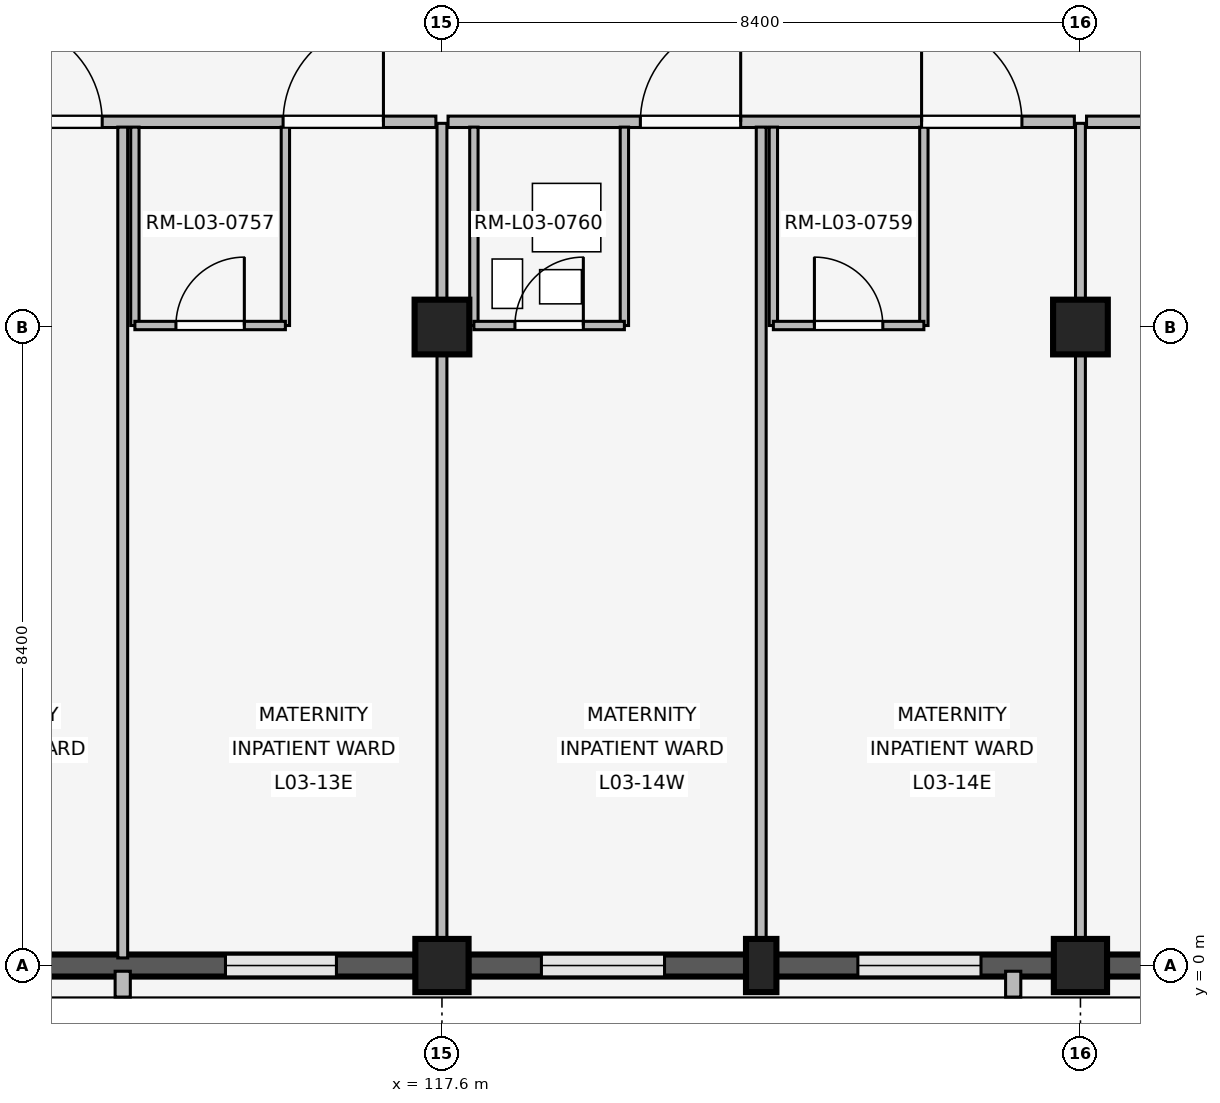
"""IFC4 building model, lengths in metres.
Left out: names, types, materials, properties, quantities, classifications, styles, units other than length and angle.
Written with IfcOpenShell. Run it as: python <this file> out.ifc"""

import sys

from ifc_helpers import new_model, si_unit, direction, frame, frame_2d, origin, origin_2d, place, context, subcontext, project, spatial, rectangle, extrude, element, fill, save


model = new_model("IFC4")
c1 = context("Model", 3, precision=1e-05, world=origin(), true_north=direction((0.0, 1.0)))
c2 = subcontext(c1, "Body", "Model", "MODEL_VIEW")
j1 = project(units=[si_unit("LENGTHUNIT", "METRE"), si_unit("PLANEANGLEUNIT", "RADIAN")], contexts=[c1])
p1 = place(None, origin())
s1 = spatial("IfcSite", under=j1, at=p1, CompositionType="ELEMENT")
p2 = place(p1, origin())
s2 = spatial("IfcBuilding", under=s1, at=p2, CompositionType="ELEMENT")
p3 = place(p2, frame((0.0, 0.0, 12.9)))
s3 = spatial("IfcBuildingStorey", under=s2, at=p3, CompositionType="ELEMENT", Elevation=12.9)
p4 = place(p3, frame((117.6, 0.0, 0.0), z_axis=(0.0, 0.0, 1.0), x_axis=(1.0, 0.0, 0.0)))
e1 = element("IfcColumn", 1, at=p4, inside=s3, PredefinedType="COLUMN", context=c2, shape_type="SweptSolid", body=[
    extrude(rectangle(XDim=0.7, YDim=0.7, at=origin_2d()), origin(), (0.0, 0.0, 1.0), 3.3),
])
p5 = place(p3, frame((117.6, 8.4, 0.0), z_axis=(0.0, 0.0, 1.0), x_axis=(1.0, 0.0, 0.0)))
e2 = element("IfcColumn", 2, at=p5, inside=s3, PredefinedType="COLUMN", context=c2, shape_type="SweptSolid", body=[
    extrude(rectangle(XDim=0.72, YDim=0.72, at=origin_2d()), origin(), (0.0, 0.0, 1.0), 3.3),
])
p6 = place(p3, frame((126.0, 0.0, 0.0), z_axis=(0.0, 0.0, 1.0), x_axis=(1.0, 0.0, 0.0)))
e3 = element("IfcColumn", 3, at=p6, inside=s3, PredefinedType="COLUMN", context=c2, shape_type="SweptSolid", body=[
    extrude(rectangle(XDim=0.7, YDim=0.7, at=origin_2d()), origin(), (0.0, 0.0, 1.0), 3.3),
])
p7 = place(p3, frame((126.0, 8.4, 0.0), z_axis=(0.0, 0.0, 1.0), x_axis=(1.0, 0.0, 0.0)))
e4 = element("IfcColumn", 4, at=p7, inside=s3, PredefinedType="COLUMN", context=c2, shape_type="SweptSolid", body=[
    extrude(rectangle(XDim=0.72, YDim=0.72, at=origin_2d()), origin(), (0.0, 0.0, 1.0), 3.3),
])
p8 = place(p3, frame((121.8, 0.0, 0.0), z_axis=(0.0, 0.0, 1.0), x_axis=(1.0, 0.0, 0.0)))
e5 = element("IfcColumn", 5, at=p8, inside=s3, PredefinedType="PILASTER", context=c2, shape_type="SweptSolid", body=[
    extrude(rectangle(XDim=0.4, YDim=0.7, at=origin_2d()), origin(), (0.0, 0.0, 1.0), 3.3),
])
p9 = place(p3, frame((117.255, 0.0, 0.0), z_axis=(0.0, 0.0, 1.0), x_axis=(-1.0, 0.0, 0.0)))
e6 = element("IfcWall", 6, at=p9, inside=s3, PredefinedType="SOLIDWALL", context=c2, shape_type="SweptSolid", body=[
    extrude(rectangle(XDim=7.71, YDim=0.29, at=frame_2d((3.855, 0.0))), origin(), (0.0, 0.0, 1.0), 2.44),
])
p10 = place(p9, frame((1.043, 0.0, 0.85)))
e7 = element("IfcOpeningElement", 7, at=p10, cuts=e6, PredefinedType="OPENING", context=c2, shape_type="SweptSolid", body=[
    extrude(rectangle(XDim=1.46, YDim=0.85, at=frame_2d((0.73, 0.425))), frame((0.0, 0.155, 0.0), z_axis=(0.0, -1.0, 0.0), x_axis=(1.0, 0.0, 0.0)), (0.0, 0.0, 1.0), 0.31),
])
p11 = place(p9, frame((5.207, 0.0, 0.85)))
e8 = element("IfcOpeningElement", 8, at=p11, cuts=e6, PredefinedType="OPENING", context=c2, shape_type="SweptSolid", body=[
    extrude(rectangle(XDim=1.46, YDim=0.85, at=frame_2d((0.73, 0.425))), frame((0.0, 0.155, 0.0), z_axis=(0.0, -1.0, 0.0), x_axis=(1.0, 0.0, 0.0)), (0.0, 0.0, 1.0), 0.31),
])
p12 = place(p3, frame((113.4, -0.075, 0.0), z_axis=(0.0, 0.0, 1.0), x_axis=(0.0, -1.0, 0.0)))
e9 = element("IfcWall", 9, at=p12, inside=s3, PredefinedType="ELEMENTEDWALL", context=c2, shape_type="SweptSolid", body=[
    extrude(rectangle(XDim=0.34, YDim=0.2, at=frame_2d((0.17, 0.0))), origin(), (0.0, 0.0, 1.0), 2.42),
])
p13 = place(p3, frame((125.655, 0.0, 0.0), z_axis=(0.0, 0.0, 1.0), x_axis=(-1.0, 0.0, 0.0)))
e10 = element("IfcWall", 10, at=p13, inside=s3, PredefinedType="SOLIDWALL", context=c2, shape_type="SweptSolid", body=[
    extrude(rectangle(XDim=7.71, YDim=0.29, at=frame_2d((3.855, 0.0))), origin(), (0.0, 0.0, 1.0), 2.44),
])
p14 = place(p13, frame((0.963, 0.0, 0.85)))
e11 = element("IfcOpeningElement", 11, at=p14, cuts=e10, PredefinedType="OPENING", context=c2, shape_type="SweptSolid", body=[
    extrude(rectangle(XDim=1.62, YDim=0.95, at=frame_2d((0.81, 0.475))), frame((0.0, 0.155, 0.0), z_axis=(0.0, -1.0, 0.0), x_axis=(1.0, 0.0, 0.0)), (0.0, 0.0, 1.0), 0.31),
])
p15 = place(p13, frame((5.127, 0.0, 0.85)))
e12 = element("IfcOpeningElement", 12, at=p15, cuts=e10, PredefinedType="OPENING", context=c2, shape_type="SweptSolid", body=[
    extrude(rectangle(XDim=1.62, YDim=0.95, at=frame_2d((0.81, 0.475))), frame((0.0, 0.155, 0.0), z_axis=(0.0, -1.0, 0.0), x_axis=(1.0, 0.0, 0.0)), (0.0, 0.0, 1.0), 0.31),
])
p16 = place(p3, frame((125.115, -0.075, 0.0), z_axis=(0.0, 0.0, 1.0), x_axis=(0.0, -1.0, 0.0)))
e13 = element("IfcWall", 13, at=p16, inside=s3, PredefinedType="ELEMENTEDWALL", context=c2, shape_type="SweptSolid", body=[
    extrude(rectangle(XDim=0.34, YDim=0.2, at=frame_2d((0.17, 0.0))), origin(), (0.0, 0.0, 1.0), 2.42),
])
p17 = place(p3, frame((134.055, 0.0, 0.0), z_axis=(0.0, 0.0, 1.0), x_axis=(-1.0, 0.0, 0.0)))
e14 = element("IfcWall", 14, at=p17, inside=s3, PredefinedType="SOLIDWALL", context=c2, shape_type="SweptSolid", body=[
    extrude(rectangle(XDim=7.71, YDim=0.29, at=frame_2d((3.855, 0.0))), origin(), (0.0, 0.0, 1.0), 2.44),
])
p18 = place(p17, frame((1.043, 0.0, 0.85)))
e15 = element("IfcOpeningElement", 15, at=p18, cuts=e14, PredefinedType="OPENING", context=c2, shape_type="SweptSolid", body=[
    extrude(rectangle(XDim=1.46, YDim=0.85, at=frame_2d((0.73, 0.425))), frame((0.0, 0.155, 0.0), z_axis=(0.0, -1.0, 0.0), x_axis=(1.0, 0.0, 0.0)), (0.0, 0.0, 1.0), 0.31),
])
p19 = place(p17, frame((5.207, 0.0, 0.85)))
e16 = element("IfcOpeningElement", 16, at=p19, cuts=e14, PredefinedType="OPENING", context=c2, shape_type="SweptSolid", body=[
    extrude(rectangle(XDim=1.46, YDim=0.85, at=frame_2d((0.73, 0.425))), frame((0.0, 0.155, 0.0), z_axis=(0.0, -1.0, 0.0), x_axis=(1.0, 0.0, 0.0)), (0.0, 0.0, 1.0), 0.31),
])
p20 = place(p3, frame((109.28, 11.1, 0.0), z_axis=(0.0, 0.0, 1.0), x_axis=(1.0, 0.0, 0.0)))
e17 = element("IfcWall", 17, at=p20, inside=s3, PredefinedType="PARTITIONING", context=c2, shape_type="SweptSolid", body=[
    extrude(rectangle(XDim=8.24, YDim=0.15, at=frame_2d((4.12, 0.0))), origin(), (0.0, 0.0, 1.0), 2.42),
])
p21 = place(p20, frame((2.53, 0.0, 0.0)))
e18 = element("IfcOpeningElement", 18, at=p21, cuts=e17, PredefinedType="OPENING", context=c2, shape_type="SweptSolid", body=[
    extrude(rectangle(XDim=1.32, YDim=2.25, at=frame_2d((0.66, 1.125))), frame((0.0, 0.085, 0.0), z_axis=(0.0, -1.0, 0.0), x_axis=(1.0, 0.0, 0.0)), (0.0, 0.0, 1.0), 0.17),
])
p22 = place(p20, frame((6.23, 0.0, 0.0)))
e19 = element("IfcOpeningElement", 19, at=p22, cuts=e17, PredefinedType="OPENING", context=c2, shape_type="SweptSolid", body=[
    extrude(rectangle(XDim=1.32, YDim=2.25, at=frame_2d((0.66, 1.125))), frame((0.0, 0.085, 0.0), z_axis=(0.0, -1.0, 0.0), x_axis=(1.0, 0.0, 0.0)), (0.0, 0.0, 1.0), 0.17),
])
p23 = place(p3, frame((113.4, 0.1, 0.0), z_axis=(0.0, 0.0, 1.0), x_axis=(0.0, 1.0, 0.0)))
e20 = element("IfcWall", 20, at=p23, inside=s3, PredefinedType="PARTITIONING", context=c2, shape_type="SweptSolid", body=[
    extrude(rectangle(XDim=10.93, YDim=0.13, at=frame_2d((5.465, 0.0))), origin(), (0.0, 0.0, 1.0), 2.42),
])
for number, where, z_axis, x_axis in (
    (21, (113.56, 8.42, 0.0), (0.0, 0.0, 1.0), (0.0, 1.0, 0.0)),
    (22, (115.54, 8.42, 0.0), (0.0, 0.0, 1.0), (0.0, 1.0, 0.0)),
):
    element("IfcWall", number, at=place(p3, frame(where, z_axis=z_axis, x_axis=x_axis)), inside=s3, PredefinedType="PARTITIONING", context=c2, shape_type="SweptSolid", body=[
        extrude(rectangle(XDim=2.61, YDim=0.11, at=frame_2d((1.305, 0.0))), origin(), (0.0, 0.0, 1.0), 2.42),
    ])
p24 = place(p3, frame((113.56, 8.42, 0.0), z_axis=(0.0, 0.0, 1.0), x_axis=(1.0, 0.0, 0.0)))
e23 = element("IfcWall", 23, at=p24, inside=s3, PredefinedType="PARTITIONING", context=c2, shape_type="SweptSolid", body=[
    extrude(rectangle(XDim=1.98, YDim=0.11, at=frame_2d((0.99, 0.0))), origin(), (0.0, 0.0, 1.0), 2.42),
])
p25 = place(p24, frame((0.54, 0.0, 0.0)))
e24 = element("IfcOpeningElement", 24, at=p25, cuts=e23, PredefinedType="OPENING", context=c2, shape_type="SweptSolid", body=[
    extrude(rectangle(XDim=0.9, YDim=2.1, at=frame_2d((0.45, 1.05))), frame((0.0, 0.065, 0.0), z_axis=(0.0, -1.0, 0.0), x_axis=(1.0, 0.0, 0.0)), (0.0, 0.0, 1.0), 0.13),
])
p26 = place(p3, frame((117.6, 0.14, 0.0), z_axis=(0.0, 0.0, 1.0), x_axis=(0.0, 1.0, 0.0)))
e25 = element("IfcWall", 25, at=p26, inside=s3, PredefinedType="PARTITIONING", context=c2, shape_type="SweptSolid", body=[
    extrude(rectangle(XDim=10.94, YDim=0.13, at=frame_2d((5.47, 0.0))), origin(), (0.0, 0.0, 1.0), 2.42),
])
p27 = place(p3, frame((117.68, 11.1, 0.0), z_axis=(0.0, 0.0, 1.0), x_axis=(1.0, 0.0, 0.0)))
e26 = element("IfcWall", 26, at=p27, inside=s3, PredefinedType="PARTITIONING", context=c2, shape_type="SweptSolid", body=[
    extrude(rectangle(XDim=8.24, YDim=0.15, at=frame_2d((4.12, 0.0))), origin(), (0.0, 0.0, 1.0), 2.42),
])
p28 = place(p27, frame((2.53, 0.0, 0.0)))
e27 = element("IfcOpeningElement", 27, at=p28, cuts=e26, PredefinedType="OPENING", context=c2, shape_type="SweptSolid", body=[
    extrude(rectangle(XDim=1.32, YDim=2.25, at=frame_2d((0.66, 1.125))), frame((0.0, 0.085, 0.0), z_axis=(0.0, -1.0, 0.0), x_axis=(1.0, 0.0, 0.0)), (0.0, 0.0, 1.0), 0.17),
])
p29 = place(p27, frame((6.23, 0.0, 0.0)))
e28 = element("IfcOpeningElement", 28, at=p29, cuts=e26, PredefinedType="OPENING", context=c2, shape_type="SweptSolid", body=[
    extrude(rectangle(XDim=1.32, YDim=2.25, at=frame_2d((0.66, 1.125))), frame((0.0, 0.085, 0.0), z_axis=(0.0, -1.0, 0.0), x_axis=(1.0, 0.0, 0.0)), (0.0, 0.0, 1.0), 0.17),
])
p30 = place(p3, frame((121.8, 0.1, 0.0), z_axis=(0.0, 0.0, 1.0), x_axis=(0.0, 1.0, 0.0)))
e29 = element("IfcWall", 29, at=p30, inside=s3, PredefinedType="PARTITIONING", context=c2, shape_type="SweptSolid", body=[
    extrude(rectangle(XDim=10.93, YDim=0.13, at=frame_2d((5.465, 0.0))), origin(), (0.0, 0.0, 1.0), 2.42),
])
for number, where, z_axis, x_axis in (
    (30, (118.02, 8.42, 0.0), (0.0, 0.0, 1.0), (0.0, 1.0, 0.0)),
    (31, (120.0, 8.42, 0.0), (0.0, 0.0, 1.0), (0.0, 1.0, 0.0)),
):
    element("IfcWall", number, at=place(p3, frame(where, z_axis=z_axis, x_axis=x_axis)), inside=s3, PredefinedType="PARTITIONING", context=c2, shape_type="SweptSolid", body=[
        extrude(rectangle(XDim=2.61, YDim=0.11, at=frame_2d((1.305, 0.0))), origin(), (0.0, 0.0, 1.0), 2.42),
    ])
p31 = place(p3, frame((118.02, 8.42, 0.0), z_axis=(0.0, 0.0, 1.0), x_axis=(1.0, 0.0, 0.0)))
e32 = element("IfcWall", 32, at=p31, inside=s3, PredefinedType="PARTITIONING", context=c2, shape_type="SweptSolid", body=[
    extrude(rectangle(XDim=1.98, YDim=0.11, at=frame_2d((0.99, 0.0))), origin(), (0.0, 0.0, 1.0), 2.42),
])
p32 = place(p31, frame((0.54, 0.0, 0.0)))
e33 = element("IfcOpeningElement", 33, at=p32, cuts=e32, PredefinedType="OPENING", context=c2, shape_type="SweptSolid", body=[
    extrude(rectangle(XDim=0.9, YDim=2.1, at=frame_2d((0.45, 1.05))), frame((0.0, 0.065, 0.0), z_axis=(0.0, -1.0, 0.0), x_axis=(1.0, 0.0, 0.0)), (0.0, 0.0, 1.0), 0.13),
])
for number, where, z_axis, x_axis in (
    (34, (121.96, 8.42, 0.0), (0.0, 0.0, 1.0), (0.0, 1.0, 0.0)),
    (35, (123.94, 8.42, 0.0), (0.0, 0.0, 1.0), (0.0, 1.0, 0.0)),
):
    element("IfcWall", number, at=place(p3, frame(where, z_axis=z_axis, x_axis=x_axis)), inside=s3, PredefinedType="PARTITIONING", context=c2, shape_type="SweptSolid", body=[
        extrude(rectangle(XDim=2.61, YDim=0.11, at=frame_2d((1.305, 0.0))), origin(), (0.0, 0.0, 1.0), 2.42),
    ])
p33 = place(p3, frame((121.96, 8.42, 0.0), z_axis=(0.0, 0.0, 1.0), x_axis=(1.0, 0.0, 0.0)))
e36 = element("IfcWall", 36, at=p33, inside=s3, PredefinedType="PARTITIONING", context=c2, shape_type="SweptSolid", body=[
    extrude(rectangle(XDim=1.98, YDim=0.11, at=frame_2d((0.99, 0.0))), origin(), (0.0, 0.0, 1.0), 2.42),
])
p34 = place(p33, frame((0.54, 0.0, 0.0)))
e37 = element("IfcOpeningElement", 37, at=p34, cuts=e36, PredefinedType="OPENING", context=c2, shape_type="SweptSolid", body=[
    extrude(rectangle(XDim=0.9, YDim=2.1, at=frame_2d((0.45, 1.05))), frame((0.0, 0.065, 0.0), z_axis=(0.0, -1.0, 0.0), x_axis=(1.0, 0.0, 0.0)), (0.0, 0.0, 1.0), 0.13),
])
p35 = place(p3, frame((126.0, 0.14, 0.0), z_axis=(0.0, 0.0, 1.0), x_axis=(0.0, 1.0, 0.0)))
e38 = element("IfcWall", 38, at=p35, inside=s3, PredefinedType="PARTITIONING", context=c2, shape_type="SweptSolid", body=[
    extrude(rectangle(XDim=10.94, YDim=0.13, at=frame_2d((5.47, 0.0))), origin(), (0.0, 0.0, 1.0), 2.42),
])
p36 = place(p3, frame((126.08, 11.1, 0.0), z_axis=(0.0, 0.0, 1.0), x_axis=(1.0, 0.0, 0.0)))
e39 = element("IfcWall", 39, at=p36, inside=s3, PredefinedType="PARTITIONING", context=c2, shape_type="SweptSolid", body=[
    extrude(rectangle(XDim=8.18, YDim=0.15, at=frame_2d((4.09, 0.0))), origin(), (0.0, 0.0, 1.0), 2.42),
])
p37 = place(p36, frame((1.53, 0.0, 0.0)))
e40 = element("IfcOpeningElement", 40, at=p37, cuts=e39, PredefinedType="OPENING", context=c2, shape_type="SweptSolid", body=[
    extrude(rectangle(XDim=1.85, YDim=2.3, at=frame_2d((0.925, 1.15))), frame((0.0, 0.085, 0.0), z_axis=(0.0, -1.0, 0.0), x_axis=(1.0, 0.0, 0.0)), (0.0, 0.0, 1.0), 0.17),
])
p38 = place(p10, origin())
e41 = element("IfcWindow", 41, at=p38, inside=s3, PartitioningType="SINGLE_PANEL", PredefinedType="WINDOW", context=c2, shape_type="SweptSolid", body=[
    extrude(rectangle(XDim=1.46, YDim=0.85, at=frame_2d((0.73, 0.425))), frame((0.0, 0.03, 0.0), z_axis=(0.0, -1.0, 0.0), x_axis=(1.0, 0.0, 0.0)), (0.0, 0.0, 1.0), 0.06),
])
fill(e7, e41)
p39 = place(p14, origin())
e42 = element("IfcWindow", 42, at=p39, inside=s3, PartitioningType="SINGLE_PANEL", PredefinedType="WINDOW", context=c2, shape_type="SweptSolid", body=[
    extrude(rectangle(XDim=1.62, YDim=0.95, at=frame_2d((0.81, 0.475))), frame((0.0, 0.03, 0.0), z_axis=(0.0, -1.0, 0.0), x_axis=(1.0, 0.0, 0.0)), (0.0, 0.0, 1.0), 0.06),
])
fill(e11, e42)
p40 = place(p15, origin())
e43 = element("IfcWindow", 43, at=p40, inside=s3, PartitioningType="SINGLE_PANEL", PredefinedType="WINDOW", context=c2, shape_type="SweptSolid", body=[
    extrude(rectangle(XDim=1.62, YDim=0.95, at=frame_2d((0.81, 0.475))), frame((0.0, 0.03, 0.0), z_axis=(0.0, -1.0, 0.0), x_axis=(1.0, 0.0, 0.0)), (0.0, 0.0, 1.0), 0.06),
])
fill(e12, e43)
p41 = place(p21, origin())
e44 = element("IfcDoor", 44, at=p41, inside=s3, OperationType="SINGLE_SWING_LEFT", PredefinedType="DOOR", context=c2, shape_type="SweptSolid", body=[
    extrude(rectangle(XDim=1.32, YDim=2.25, at=frame_2d((0.66, 1.125))), frame((0.0, 0.025, 0.0), z_axis=(0.0, -1.0, 0.0), x_axis=(1.0, 0.0, 0.0)), (0.0, 0.0, 1.0), 0.05),
])
fill(e18, e44)
p42 = place(p22, origin())
e45 = element("IfcDoor", 45, at=p42, inside=s3, OperationType="SINGLE_SWING_RIGHT", PredefinedType="DOOR", context=c2, shape_type="SweptSolid", body=[
    extrude(rectangle(XDim=1.32, YDim=2.25, at=frame_2d((0.66, 1.125))), frame((0.0, 0.025, 0.0), z_axis=(0.0, -1.0, 0.0), x_axis=(1.0, 0.0, 0.0)), (0.0, 0.0, 1.0), 0.05),
])
fill(e19, e45)
p43 = place(p25, origin())
e46 = element("IfcDoor", 46, at=p43, inside=s3, OperationType="SINGLE_SWING_RIGHT", PredefinedType="DOOR", context=c2, shape_type="SweptSolid", body=[
    extrude(rectangle(XDim=0.9, YDim=2.1, at=frame_2d((0.45, 1.05))), frame((0.0, 0.025, 0.0), z_axis=(0.0, -1.0, 0.0), x_axis=(1.0, 0.0, 0.0)), (0.0, 0.0, 1.0), 0.05),
])
fill(e24, e46)
p44 = place(p28, origin())
e47 = element("IfcDoor", 47, at=p44, inside=s3, OperationType="SINGLE_SWING_RIGHT", PredefinedType="DOOR", context=c2, shape_type="SweptSolid", body=[
    extrude(rectangle(XDim=1.32, YDim=2.25, at=frame_2d((0.66, 1.125))), frame((0.0, 0.025, 0.0), z_axis=(0.0, -1.0, 0.0), x_axis=(1.0, 0.0, 0.0)), (0.0, 0.0, 1.0), 0.05),
])
fill(e27, e47)
p45 = place(p29, origin())
e48 = element("IfcDoor", 48, at=p45, inside=s3, OperationType="SINGLE_SWING_LEFT", PredefinedType="DOOR", context=c2, shape_type="SweptSolid", body=[
    extrude(rectangle(XDim=1.32, YDim=2.25, at=frame_2d((0.66, 1.125))), frame((0.0, 0.025, 0.0), z_axis=(0.0, -1.0, 0.0), x_axis=(1.0, 0.0, 0.0)), (0.0, 0.0, 1.0), 0.05),
])
fill(e28, e48)
p46 = place(p32, origin())
e49 = element("IfcDoor", 49, at=p46, inside=s3, OperationType="SINGLE_SWING_RIGHT", PredefinedType="DOOR", context=c2, shape_type="SweptSolid", body=[
    extrude(rectangle(XDim=0.9, YDim=2.1, at=frame_2d((0.45, 1.05))), frame((0.0, 0.025, 0.0), z_axis=(0.0, -1.0, 0.0), x_axis=(1.0, 0.0, 0.0)), (0.0, 0.0, 1.0), 0.05),
])
fill(e33, e49)
p47 = place(p34, origin())
e50 = element("IfcDoor", 50, at=p47, inside=s3, OperationType="SINGLE_SWING_LEFT", PredefinedType="DOOR", context=c2, shape_type="SweptSolid", body=[
    extrude(rectangle(XDim=0.9, YDim=2.1, at=frame_2d((0.45, 1.05))), frame((0.0, 0.025, 0.0), z_axis=(0.0, -1.0, 0.0), x_axis=(1.0, 0.0, 0.0)), (0.0, 0.0, 1.0), 0.05),
])
fill(e37, e50)
save(model, sys.argv[1])
